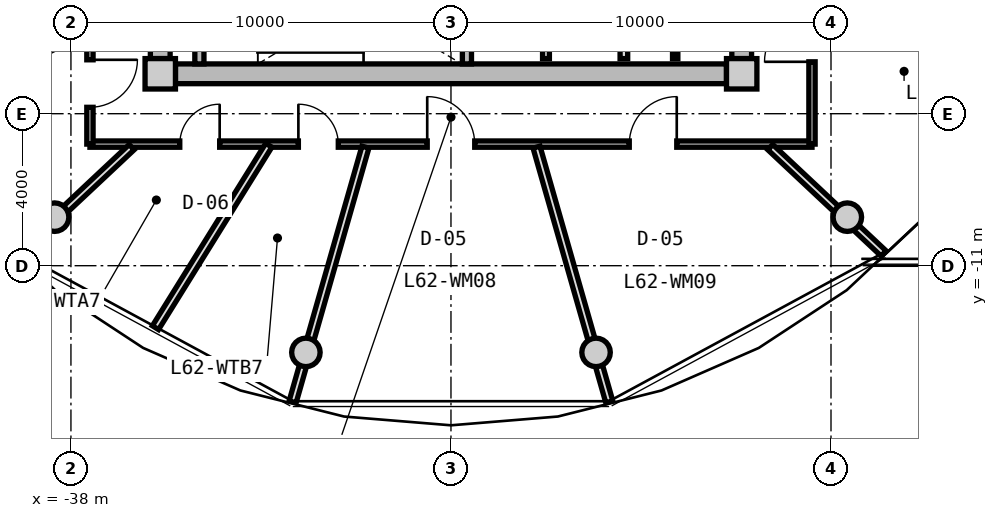
"""IFC4 building model, lengths in metres.
Left out: names, types, materials, properties, quantities, classifications, styles, units other than length and angle.
Written with IfcOpenShell. Run it as: python <this file> out.ifc"""

import sys

from ifc_helpers import new_model, si_unit, direction, frame, frame_2d, origin, origin_2d, place, context, subcontext, project, spatial, rectangle, circle, extrude, source, transform, mapped, element, fill, save


model = new_model("IFC4")
c1 = context("Model", 3, precision=1e-05, world=origin(), true_north=direction((0.0, 1.0)))
c2 = subcontext(c1, "Body", "Model", "MODEL_VIEW")
j1 = project(units=[si_unit("LENGTHUNIT", "METRE"), si_unit("PLANEANGLEUNIT", "RADIAN")], contexts=[c1])
p1 = place(None, origin())
s1 = spatial("IfcSite", under=j1, at=p1, CompositionType="ELEMENT")
p2 = place(p1, origin())
s2 = spatial("IfcBuilding", under=s1, at=p2, CompositionType="ELEMENT")
p3 = place(p2, frame((0.0, 0.0, 199.8)))
s3 = spatial("IfcBuildingStorey", under=s2, at=p3, CompositionType="ELEMENT", Elevation=199.8)
m1 = source(origin(), c2, "Body", "SweptSolid", [
    extrude(rectangle(XDim=0.8, YDim=0.8, at=origin_2d()), origin(), (0.0, 0.0, 1.0), 4.0),
])
for number, where, z_axis, x_axis in (
    (1, (-35.65, -5.95, 0.0), (0.0, 0.0, 1.0), (1.0, 0.0, 0.0)),
    (2, (-20.35, -5.95, 0.0), (0.0, 0.0, 1.0), (1.0, 0.0, 0.0)),
):
    element("IfcColumn", number, at=place(p3, frame(where, z_axis=z_axis, x_axis=x_axis)), inside=s3, PredefinedType="COLUMN", context=c2, shape_type="MappedRepresentation", body=[
        mapped(m1, transform((0.0, 0.0, 0.0), x_axis=(1.0, 0.0, 0.0), y_axis=(0.0, 1.0, 0.0), z_axis=(0.0, 0.0, 1.0), scale=1.0)),
    ])
m2 = source(origin(), c2, "Body", "SweptSolid", [
    extrude(rectangle(XDim=14.5, YDim=0.52, at=frame_2d((7.25, 0.0))), origin(), (0.0, 0.0, 1.0), 3.71),
])
p4 = place(p3, frame((-20.75, -5.95, 0.0), z_axis=(0.0, 0.0, 1.0), x_axis=(-1.0, 0.0, 0.0)))
e3 = element("IfcWall", 3, at=p4, inside=s3, PredefinedType="SHEAR", context=c2, shape_type="MappedRepresentation", body=[
    mapped(m2, transform((0.0, 0.0, 0.0), x_axis=(1.0, 0.0, 0.0), y_axis=(0.0, 1.0, 0.0), z_axis=(0.0, 0.0, 1.0), scale=1.0)),
])
m3 = source(origin(), c2, "Body", "SweptSolid", [
    extrude(rectangle(XDim=11.1, YDim=0.52, at=frame_2d((5.55, 0.0))), origin(), (0.0, 0.0, 1.0), 3.71),
])
p5 = place(p3, frame((-35.65, -5.55, 0.0), z_axis=(0.0, 0.0, 1.0), x_axis=(0.0, 1.0, 0.0)))
e4 = element("IfcWall", 4, at=p5, inside=s3, PredefinedType="SHEAR", context=c2, shape_type="MappedRepresentation", body=[
    mapped(m3, transform((0.0, 0.0, 0.0), x_axis=(1.0, 0.0, 0.0), y_axis=(0.0, 1.0, 0.0), z_axis=(0.0, 0.0, 1.0), scale=1.0)),
])
p6 = place(p5, frame((3.8, 0.0, 0.0)))
e5 = element("IfcOpeningElement", 5, at=p6, cuts=e4, PredefinedType="OPENING", context=c2, shape_type="SweptSolid", body=[
    extrude(rectangle(XDim=1.2, YDim=2.15, at=frame_2d((0.6, 1.075))), frame((0.0, 0.27, 0.0), z_axis=(0.0, -1.0, 0.0), x_axis=(1.0, 0.0, 0.0)), (0.0, 0.0, 1.0), 0.54),
])
p7 = place(p3, frame((-20.35, 5.55, 0.0), z_axis=(0.0, 0.0, 1.0), x_axis=(0.0, -1.0, 0.0)))
e6 = element("IfcWall", 6, at=p7, inside=s3, PredefinedType="SHEAR", context=c2, shape_type="MappedRepresentation", body=[
    mapped(m3, transform((0.0, 0.0, 0.0), x_axis=(1.0, 0.0, 0.0), y_axis=(0.0, 1.0, 0.0), z_axis=(0.0, 0.0, 1.0), scale=1.0)),
])
p8 = place(p7, frame((5.65, 0.0, 0.0)))
e7 = element("IfcOpeningElement", 7, at=p8, cuts=e6, PredefinedType="OPENING", context=c2, shape_type="SweptSolid", body=[
    extrude(rectangle(XDim=1.2, YDim=2.15, at=frame_2d((0.6, 1.075))), frame((0.0, 0.27, 0.0), z_axis=(0.0, -1.0, 0.0), x_axis=(1.0, 0.0, 0.0)), (0.0, 0.0, 1.0), 0.54),
])
m4 = source(origin(), c2, "Body", "SweptSolid", [
    extrude(circle(Radius=0.375, at=origin_2d()), origin(), (0.0, 0.0, 1.0), 4.0),
])
for number, where, z_axis, x_axis in (
    (8, (-38.43, -9.723, 0.0), (0.0, 0.0, 1.0), (1.0, 0.0, 0.0)),
    (9, (-31.818, -13.281, 0.0), (0.0, 0.0, 1.0), (1.0, 0.0, 0.0)),
    (10, (-24.182, -13.281, 0.0), (0.0, 0.0, 1.0), (1.0, 0.0, 0.0)),
    (11, (-17.57, -9.723, 0.0), (0.0, 0.0, 1.0), (1.0, 0.0, 0.0)),
):
    element("IfcColumn", number, at=place(p3, frame(where, z_axis=z_axis, x_axis=x_axis)), inside=s3, PredefinedType="COLUMN", context=c2, shape_type="MappedRepresentation", body=[
        mapped(m4, transform((0.0, 0.0, 0.0), x_axis=(1.0, 0.0, 0.0), y_axis=(0.0, 1.0, 0.0), z_axis=(0.0, 0.0, 1.0), scale=1.0)),
    ])
m5 = source(origin(), c2, "Body", "SweptSolid", [
    extrude(rectangle(XDim=3.24, YDim=0.24, at=frame_2d((1.62, 0.0))), origin(), (0.0, 0.0, 1.0), 3.71),
])
for number, where, z_axis, x_axis in (
    (12, (-34.62, -5.69, 0.0), (0.0, 0.0, 1.0), (0.0, 1.0, 0.0)),
    (13, (-27.58, -5.69, 0.0), (0.0, 0.0, 1.0), (0.0, 1.0, 0.0)),
):
    element("IfcWall", number, at=place(p3, frame(where, z_axis=z_axis, x_axis=x_axis)), inside=s3, PredefinedType="PARTITIONING", context=c2, shape_type="MappedRepresentation", body=[
        mapped(m5, transform((0.0, 0.0, 0.0), x_axis=(1.0, 0.0, 0.0), y_axis=(0.0, 1.0, 0.0), z_axis=(0.0, 0.0, 1.0), scale=1.0)),
    ])
m6 = source(origin(), c2, "Body", "SweptSolid", [
    extrude(rectangle(XDim=3.8, YDim=0.2, at=frame_2d((1.9, 0.0))), origin(), (0.0, 0.0, 1.0), 3.695),
])
p9 = place(p3, frame((-23.45, -5.55, 0.0), z_axis=(0.0, 0.0, 1.0), x_axis=(0.0, 1.0, 0.0)))
e14 = element("IfcWall", 14, at=p9, inside=s3, PredefinedType="PARTITIONING", context=c2, shape_type="MappedRepresentation", body=[
    mapped(m6, transform((0.0, 0.0, 0.0), x_axis=(1.0, 0.0, 0.0), y_axis=(0.0, 1.0, 0.0), z_axis=(0.0, 0.0, 1.0), scale=1.0)),
])
m7 = source(origin(), c2, "Body", "SweptSolid", [
    extrude(rectangle(XDim=4.2, YDim=0.18, at=frame_2d((2.1, 0.0))), origin(), (0.0, 0.0, 1.0), 3.695),
])
p10 = place(p3, frame((-25.5, -5.55, 0.0), z_axis=(0.0, 0.0, 1.0), x_axis=(0.0, 1.0, 0.0)))
e15 = element("IfcWall", 15, at=p10, inside=s3, PredefinedType="PARTITIONING", context=c2, shape_type="MappedRepresentation", body=[
    mapped(m7, transform((0.0, 0.0, 0.0), x_axis=(1.0, 0.0, 0.0), y_axis=(0.0, 1.0, 0.0), z_axis=(0.0, 0.0, 1.0), scale=1.0)),
])
m8 = source(origin(), c2, "Body", "SweptSolid", [
    extrude(rectangle(XDim=3.8, YDim=0.14, at=frame_2d((1.9, 0.0))), origin(), (0.0, 0.0, 1.0), 3.695),
])
p11 = place(p3, frame((-22.1, -5.55, 0.0), z_axis=(0.0, 0.0, 1.0), x_axis=(0.0, 1.0, 0.0)))
e16 = element("IfcWall", 16, at=p11, inside=s3, PredefinedType="PARTITIONING", context=c2, shape_type="MappedRepresentation", body=[
    mapped(m8, transform((0.0, 0.0, 0.0), x_axis=(1.0, 0.0, 0.0), y_axis=(0.0, 1.0, 0.0), z_axis=(0.0, 0.0, 1.0), scale=1.0)),
])
m9 = source(origin(), c2, "Body", "SweptSolid", [
    extrude(rectangle(XDim=19.0, YDim=0.165, at=frame_2d((9.5, 0.0))), origin(), (0.0, 0.0, 1.0), 3.695),
])
p12 = place(p3, frame((-18.5, -7.8, 0.0), z_axis=(0.0, 0.0, 1.0), x_axis=(-1.0, 0.0, 0.0)))
e17 = element("IfcWall", 17, at=p12, inside=s3, PredefinedType="PARTITIONING", context=c2, shape_type="MappedRepresentation", body=[
    mapped(m9, transform((0.0, 0.0, 0.0), x_axis=(1.0, 0.0, 0.0), y_axis=(0.0, 1.0, 0.0), z_axis=(0.0, 0.0, 1.0), scale=1.0)),
])
p13 = place(p12, frame((15.586, 0.0, 0.0)))
e18 = element("IfcOpeningElement", 18, at=p13, cuts=e17, PredefinedType="OPENING", context=c2, shape_type="SweptSolid", body=[
    extrude(rectangle(XDim=1.05, YDim=2.15, at=frame_2d((0.525, 1.075))), frame((0.0, 0.093, 0.0), z_axis=(0.0, -1.0, 0.0), x_axis=(1.0, 0.0, 0.0)), (0.0, 0.0, 1.0), 0.185),
])
p14 = place(p12, frame((12.465, 0.0, 0.0)))
e19 = element("IfcOpeningElement", 19, at=p14, cuts=e17, PredefinedType="OPENING", context=c2, shape_type="SweptSolid", body=[
    extrude(rectangle(XDim=1.05, YDim=2.15, at=frame_2d((0.525, 1.075))), frame((0.0, 0.093, 0.0), z_axis=(0.0, -1.0, 0.0), x_axis=(1.0, 0.0, 0.0)), (0.0, 0.0, 1.0), 0.185),
])
p15 = place(p12, frame((8.875, 0.0, 0.0)))
e20 = element("IfcOpeningElement", 20, at=p15, cuts=e17, PredefinedType="OPENING", context=c2, shape_type="SweptSolid", body=[
    extrude(rectangle(XDim=1.25, YDim=2.2, at=frame_2d((0.625, 1.1))), frame((0.0, 0.093, 0.0), z_axis=(0.0, -1.0, 0.0), x_axis=(1.0, 0.0, 0.0)), (0.0, 0.0, 1.0), 0.185),
])
p16 = place(p12, frame((3.559, 0.0, 0.0)))
e21 = element("IfcOpeningElement", 21, at=p16, cuts=e17, PredefinedType="OPENING", context=c2, shape_type="SweptSolid", body=[
    extrude(rectangle(XDim=1.25, YDim=2.2, at=frame_2d((0.625, 1.1))), frame((0.0, 0.093, 0.0), z_axis=(0.0, -1.0, 0.0), x_axis=(1.0, 0.0, 0.0)), (0.0, 0.0, 1.0), 0.185),
])
m10 = source(origin(), c2, "Body", "SweptSolid", [
    extrude(rectangle(XDim=6.88, YDim=0.165, at=frame_2d((3.44, 0.0))), origin(), (0.0, 0.0, 1.0), 3.695),
])
p17 = place(p3, frame((-37.5, -7.8, 0.0), z_axis=(0.0, 0.0, 1.0), x_axis=(0.0, 1.0, 0.0)))
e22 = element("IfcWall", 22, at=p17, inside=s3, PredefinedType="PARTITIONING", context=c2, shape_type="MappedRepresentation", body=[
    mapped(m10, transform((0.0, 0.0, 0.0), x_axis=(1.0, 0.0, 0.0), y_axis=(0.0, 1.0, 0.0), z_axis=(0.0, 0.0, 1.0), scale=1.0)),
])
p18 = place(p17, frame((0.968, 0.0, 0.0)))
e23 = element("IfcOpeningElement", 23, at=p18, cuts=e22, PredefinedType="OPENING", context=c2, shape_type="SweptSolid", body=[
    extrude(rectangle(XDim=1.25, YDim=2.2, at=frame_2d((0.625, 1.1))), frame((0.0, 0.093, 0.0), z_axis=(0.0, -1.0, 0.0), x_axis=(1.0, 0.0, 0.0)), (0.0, 0.0, 1.0), 0.185),
])
p19 = place(p3, frame((-18.5, -0.92, 0.0), z_axis=(0.0, 0.0, 1.0), x_axis=(0.0, -1.0, 0.0)))
e24 = element("IfcWall", 24, at=p19, inside=s3, PredefinedType="PARTITIONING", context=c2, shape_type="MappedRepresentation", body=[
    mapped(m10, transform((0.0, 0.0, 0.0), x_axis=(1.0, 0.0, 0.0), y_axis=(0.0, 1.0, 0.0), z_axis=(0.0, 0.0, 1.0), scale=1.0)),
])
p20 = place(p19, frame((3.464, 0.0, 0.0)))
e25 = element("IfcOpeningElement", 25, at=p20, cuts=e24, PredefinedType="OPENING", context=c2, shape_type="SweptSolid", body=[
    extrude(rectangle(XDim=1.25, YDim=2.2, at=frame_2d((0.625, 1.1))), frame((0.0, 0.093, 0.0), z_axis=(0.0, -1.0, 0.0), x_axis=(1.0, 0.0, 0.0)), (0.0, 0.0, 1.0), 0.185),
])
m11 = source(origin(), c2, "Body", "SweptSolid", [
    extrude(rectangle(XDim=4.089, YDim=0.19, at=frame_2d((2.044, 0.0))), origin(), (0.0, 0.0, 1.0), 3.295),
])
p21 = place(p3, frame((-36.402, -7.88, 0.0), z_axis=(0.0, 0.0, 1.0), x_axis=(-0.729401273609, -0.684086092577, 0.0)))
e26 = element("IfcWall", 26, at=p21, inside=s3, PredefinedType="PARTITIONING", context=c2, shape_type="MappedRepresentation", body=[
    mapped(m11, transform((0.0, 0.0, 0.0), x_axis=(1.0, 0.0, 0.0), y_axis=(0.0, 1.0, 0.0), z_axis=(0.0, 0.0, 1.0), scale=1.0)),
])
m12 = source(origin(), c2, "Body", "SweptSolid", [
    extrude(rectangle(XDim=2.06, YDim=0.14, at=frame_2d((1.03, 0.0))), origin(), (0.0, 0.0, 1.0), 3.695),
])
p22 = place(p3, frame((-37.53, -4.778, 0.0), z_axis=(0.0, 0.0, 1.0), x_axis=(-0.893952568722, -0.448161583444, 0.0)))
e27 = element("IfcWall", 27, at=p22, inside=s3, PredefinedType="PARTITIONING", context=c2, shape_type="MappedRepresentation", body=[
    mapped(m12, transform((0.0, 0.0, 0.0), x_axis=(1.0, 0.0, 0.0), y_axis=(0.0, 1.0, 0.0), z_axis=(0.0, 0.0, 1.0), scale=1.0)),
])
m13 = source(origin(), c2, "Body", "SweptSolid", [
    extrude(rectangle(XDim=6.974, YDim=0.19, at=frame_2d((3.487, 0.0))), origin(), (0.0, 0.0, 1.0), 3.295),
])
p23 = place(p3, frame((-30.251, -7.88, 0.0), z_axis=(0.0, 0.0, 1.0), x_axis=(-0.274707256801, -0.961527910703, 0.0)))
e28 = element("IfcWall", 28, at=p23, inside=s3, PredefinedType="PARTITIONING", context=c2, shape_type="MappedRepresentation", body=[
    mapped(m13, transform((0.0, 0.0, 0.0), x_axis=(1.0, 0.0, 0.0), y_axis=(0.0, 1.0, 0.0), z_axis=(0.0, 0.0, 1.0), scale=1.0)),
])
m14 = source(origin(), c2, "Body", "SweptSolid", [
    extrude(rectangle(XDim=5.652, YDim=0.19, at=frame_2d((2.826, 0.0))), origin(), (0.0, 0.0, 1.0), 3.695),
])
p24 = place(p3, frame((-32.794, -7.83, 0.0), z_axis=(0.0, 0.0, 1.0), x_axis=(-0.527566076956, -0.84951399897, 0.0)))
e29 = element("IfcWall", 29, at=p24, inside=s3, PredefinedType="PARTITIONING", context=c2, shape_type="MappedRepresentation", body=[
    mapped(m14, transform((0.0, 0.0, 0.0), x_axis=(1.0, 0.0, 0.0), y_axis=(0.0, 1.0, 0.0), z_axis=(0.0, 0.0, 1.0), scale=1.0)),
])
p25 = place(p3, frame((-25.749, -7.88, 0.0), z_axis=(0.0, 0.0, 1.0), x_axis=(0.274707256801, -0.961527910703, 0.0)))
e30 = element("IfcWall", 30, at=p25, inside=s3, PredefinedType="PARTITIONING", context=c2, shape_type="MappedRepresentation", body=[
    mapped(m13, transform((0.0, 0.0, 0.0), x_axis=(1.0, 0.0, 0.0), y_axis=(0.0, 1.0, 0.0), z_axis=(0.0, 0.0, 1.0), scale=1.0)),
])
p26 = place(p3, frame((-19.598, -7.88, 0.0), z_axis=(0.0, 0.0, 1.0), x_axis=(0.729401273609, -0.684086092577, 0.0)))
e31 = element("IfcWall", 31, at=p26, inside=s3, PredefinedType="PARTITIONING", context=c2, shape_type="MappedRepresentation", body=[
    mapped(m11, transform((0.0, 0.0, 0.0), x_axis=(1.0, 0.0, 0.0), y_axis=(0.0, 1.0, 0.0), z_axis=(0.0, 0.0, 1.0), scale=1.0)),
])
m15 = source(origin(), c2, "Body", "SweptSolid", [
    extrude(rectangle(XDim=1.25, YDim=2.2, at=frame_2d((0.625, 1.1))), frame((0.0, 0.025, 0.0), z_axis=(0.0, -1.0, 0.0), x_axis=(1.0, 0.0, 0.0)), (0.0, 0.0, 1.0), 0.05),
])
p27 = place(p18, frame((1.25, 0.0, 0.0), z_axis=(0.0, 0.0, 1.0), x_axis=(-1.0, 0.0, 0.0)))
e32 = element("IfcDoor", 32, at=p27, inside=s3, OperationType="SINGLE_SWING_LEFT", PredefinedType="DOOR", context=c2, shape_type="MappedRepresentation", body=[
    mapped(m15, transform((0.0, 0.0, 0.0), x_axis=(1.0, 0.0, 0.0), y_axis=(0.0, 1.0, 0.0), z_axis=(0.0, 0.0, 1.0), scale=1.0)),
])
fill(e23, e32)
m16 = source(origin(), c2, "Body", "SweptSolid", [
    extrude(rectangle(XDim=1.05, YDim=2.15, at=frame_2d((0.525, 1.075))), frame((0.0, 0.025, 0.0), z_axis=(0.0, -1.0, 0.0), x_axis=(1.0, 0.0, 0.0)), (0.0, 0.0, 1.0), 0.05),
])
p28 = place(p13, frame((1.05, 0.0, 0.0), z_axis=(0.0, 0.0, 1.0), x_axis=(-1.0, 0.0, 0.0)))
e33 = element("IfcDoor", 33, at=p28, inside=s3, OperationType="SINGLE_SWING_RIGHT", PredefinedType="DOOR", context=c2, shape_type="MappedRepresentation", body=[
    mapped(m16, transform((0.0, 0.0, 0.0), x_axis=(1.0, 0.0, 0.0), y_axis=(0.0, 1.0, 0.0), z_axis=(0.0, 0.0, 1.0), scale=1.0)),
])
fill(e18, e33)
p29 = place(p14, frame((1.05, 0.0, 0.0), z_axis=(0.0, 0.0, 1.0), x_axis=(-1.0, 0.0, 0.0)))
e34 = element("IfcDoor", 34, at=p29, inside=s3, OperationType="SINGLE_SWING_LEFT", PredefinedType="DOOR", context=c2, shape_type="MappedRepresentation", body=[
    mapped(m16, transform((0.0, 0.0, 0.0), x_axis=(1.0, 0.0, 0.0), y_axis=(0.0, 1.0, 0.0), z_axis=(0.0, 0.0, 1.0), scale=1.0)),
])
fill(e19, e34)
p30 = place(p15, frame((1.25, 0.0, 0.0), z_axis=(0.0, 0.0, 1.0), x_axis=(-1.0, 0.0, 0.0)))
e35 = element("IfcDoor", 35, at=p30, inside=s3, OperationType="SINGLE_SWING_LEFT", PredefinedType="DOOR", context=c2, shape_type="MappedRepresentation", body=[
    mapped(m15, transform((0.0, 0.0, 0.0), x_axis=(1.0, 0.0, 0.0), y_axis=(0.0, 1.0, 0.0), z_axis=(0.0, 0.0, 1.0), scale=1.0)),
])
fill(e20, e35)
p31 = place(p16, frame((1.25, 0.0, 0.0), z_axis=(0.0, 0.0, 1.0), x_axis=(-1.0, 0.0, 0.0)))
e36 = element("IfcDoor", 36, at=p31, inside=s3, OperationType="SINGLE_SWING_RIGHT", PredefinedType="DOOR", context=c2, shape_type="MappedRepresentation", body=[
    mapped(m15, transform((0.0, 0.0, 0.0), x_axis=(1.0, 0.0, 0.0), y_axis=(0.0, 1.0, 0.0), z_axis=(0.0, 0.0, 1.0), scale=1.0)),
])
fill(e21, e36)
p32 = place(p20, frame((1.25, 0.0, 0.0), z_axis=(0.0, 0.0, 1.0), x_axis=(-1.0, 0.0, 0.0)))
e37 = element("IfcDoor", 37, at=p32, inside=s3, OperationType="SINGLE_SWING_LEFT", PredefinedType="DOOR", context=c2, shape_type="MappedRepresentation", body=[
    mapped(m15, transform((0.0, 0.0, 0.0), x_axis=(1.0, 0.0, 0.0), y_axis=(0.0, 1.0, 0.0), z_axis=(0.0, 0.0, 1.0), scale=1.0)),
])
fill(e25, e37)
save(model, sys.argv[1])
